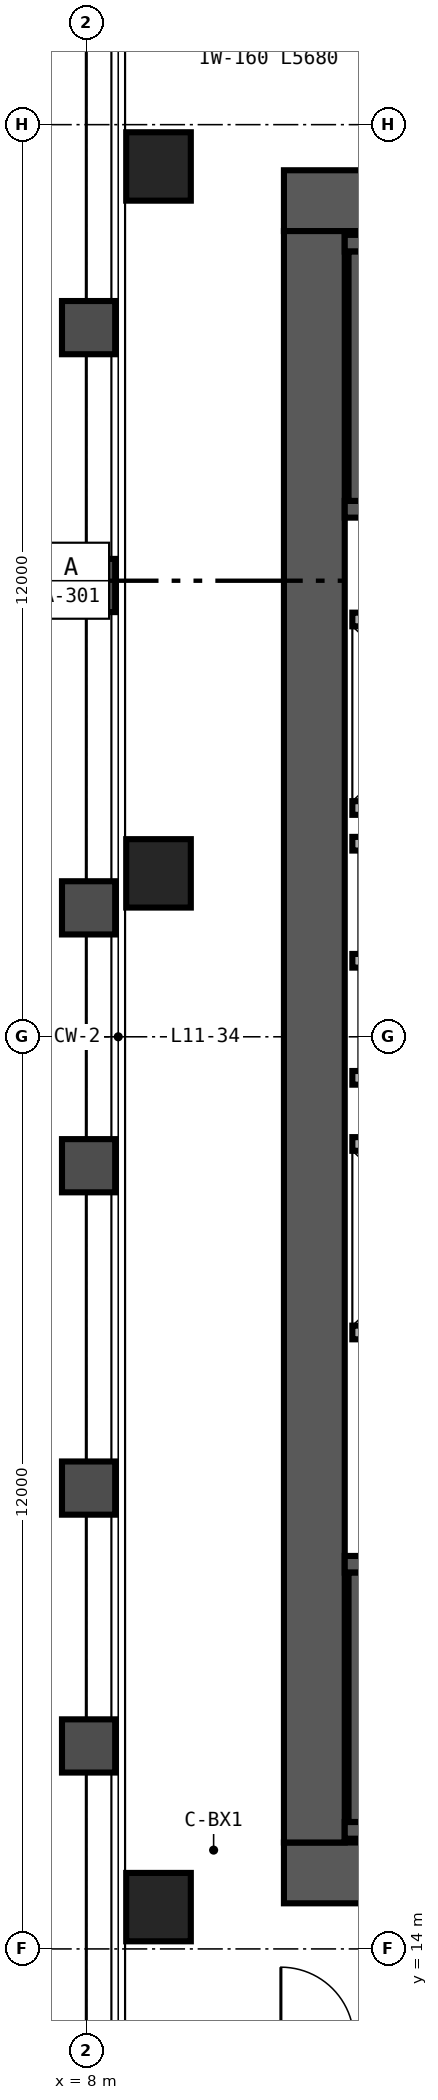
"""IFC4 building model, lengths in metres.
Left out: names, types, materials, properties, quantities, classifications, styles, units other than length and angle.
Written with IfcOpenShell. Run it as: python <this file> out.ifc"""

import sys

from ifc_helpers import new_model, si_unit, direction, frame, frame_2d, origin, origin_2d, place, context, subcontext, project, spatial, rectangle, hollow_rectangle, extrude, source, transform, mapped, element, save


model = new_model("IFC4")
c1 = context("Model", 3, precision=1e-05, world=origin(), true_north=direction((0.0, 1.0)))
c2 = subcontext(c1, "Body", "Model", "MODEL_VIEW")
j1 = project(units=[si_unit("LENGTHUNIT", "METRE"), si_unit("PLANEANGLEUNIT", "RADIAN")], contexts=[c1])
p1 = place(None, origin())
s1 = spatial("IfcSite", under=j1, at=p1, CompositionType="ELEMENT")
p2 = place(p1, origin())
s2 = spatial("IfcBuilding", under=s1, at=p2, CompositionType="ELEMENT")
p3 = place(p2, frame((0.0, 0.0, 49.2)))
s3 = spatial("IfcBuildingStorey", under=s2, at=p3, CompositionType="ELEMENT", Elevation=49.2)
p4 = place(p3, frame((10.6, 15.0, 0.0), z_axis=(0.0, 0.0, 1.0), x_axis=(1.0, 0.0, 0.0)))
e1 = element("IfcWall", 1, at=p4, inside=s3, PredefinedType="SHEAR", context=c2, shape_type="SweptSolid", body=[
    extrude(rectangle(XDim=12.8, YDim=0.8, at=frame_2d((6.4, 0.0))), origin(), (0.0, 0.0, 1.0), 3.35),
])
p5 = place(p4, frame((10.3, 0.0, 0.0)))
e2 = element("IfcOpeningElement", 2, at=p5, cuts=e1, PredefinedType="OPENING", context=c2, shape_type="SweptSolid", body=[
    extrude(rectangle(XDim=1.0, YDim=2.15, at=frame_2d((0.5, 1.075))), frame((0.0, 0.41, 0.0), z_axis=(0.0, -1.0, 0.0), x_axis=(1.0, 0.0, 0.0)), (0.0, 0.0, 1.0), 0.82),
])
p6 = place(p3, frame((10.6, 37.0, 0.0), z_axis=(0.0, 0.0, 1.0), x_axis=(1.0, 0.0, 0.0)))
e3 = element("IfcWall", 3, at=p6, inside=s3, PredefinedType="SHEAR", context=c2, shape_type="SweptSolid", body=[
    extrude(rectangle(XDim=12.8, YDim=0.8, at=frame_2d((6.4, 0.0))), origin(), (0.0, 0.0, 1.0), 3.35),
])
p7 = place(p6, frame((10.5, 0.0, 0.0)))
e4 = element("IfcOpeningElement", 4, at=p7, cuts=e3, PredefinedType="OPENING", context=c2, shape_type="SweptSolid", body=[
    extrude(rectangle(XDim=1.0, YDim=2.15, at=frame_2d((0.5, 1.075))), frame((0.0, 0.41, 0.0), z_axis=(0.0, -1.0, 0.0), x_axis=(1.0, 0.0, 0.0)), (0.0, 0.0, 1.0), 0.82),
])
p8 = place(p3, frame((11.0, 15.4, 0.0), z_axis=(0.0, 0.0, 1.0), x_axis=(0.0, 1.0, 0.0)))
e5 = element("IfcWall", 5, at=p8, inside=s3, PredefinedType="SHEAR", context=c2, shape_type="SweptSolid", body=[
    extrude(rectangle(XDim=21.2, YDim=0.8, at=frame_2d((10.6, 0.0))), origin(), (0.0, 0.0, 1.0), 3.35),
])
p9 = place(p3, frame((11.4, 15.56, 0.0), z_axis=(0.0, 0.0, 1.0), x_axis=(1.0, 0.0, 0.0)))
e6 = element("IfcWall", 6, at=p9, inside=s3, PredefinedType="SHEAR", context=c2, shape_type="SweptSolid", body=[
    extrude(rectangle(XDim=7.91, YDim=0.22, at=frame_2d((3.955, 0.0))), origin(), (0.0, 0.0, 1.0), 3.4),
])
p10 = place(p3, frame((11.4, 19.06, 0.0), z_axis=(0.0, 0.0, 1.0), x_axis=(1.0, 0.0, 0.0)))
e7 = element("IfcWall", 7, at=p10, inside=s3, PredefinedType="SHEAR", context=c2, shape_type="SweptSolid", body=[
    extrude(rectangle(XDim=7.91, YDim=0.22, at=frame_2d((3.955, 0.0))), origin(), (0.0, 0.0, 1.0), 3.4),
])
p11 = place(p10, frame((0.52, 0.0, 0.0)))
e8 = element("IfcOpeningElement", 8, at=p11, cuts=e7, PredefinedType="OPENING", context=c2, shape_type="SweptSolid", body=[
    extrude(rectangle(XDim=1.05, YDim=2.15, at=frame_2d((0.525, 1.075))), frame((0.0, 0.12, 0.0), z_axis=(0.0, -1.0, 0.0), x_axis=(1.0, 0.0, 0.0)), (0.0, 0.0, 1.0), 0.24),
])
p12 = place(p3, frame((11.56, 15.67, 0.0), z_axis=(0.0, 0.0, 1.0), x_axis=(0.0, 1.0, 0.0)))
e9 = element("IfcWall", 9, at=p12, inside=s3, PredefinedType="SHEAR", context=c2, shape_type="SweptSolid", body=[
    extrude(rectangle(XDim=3.28, YDim=0.22, at=frame_2d((1.64, 0.0))), origin(), (0.0, 0.0, 1.0), 3.4),
])
p13 = place(p3, frame((11.4, 32.94, 0.0), z_axis=(0.0, 0.0, 1.0), x_axis=(1.0, 0.0, 0.0)))
e10 = element("IfcWall", 10, at=p13, inside=s3, PredefinedType="SHEAR", context=c2, shape_type="SweptSolid", body=[
    extrude(rectangle(XDim=7.91, YDim=0.22, at=frame_2d((3.955, 0.0))), origin(), (0.0, 0.0, 1.0), 3.4),
])
p14 = place(p13, frame((0.52, 0.0, 0.0)))
e11 = element("IfcOpeningElement", 11, at=p14, cuts=e10, PredefinedType="OPENING", context=c2, shape_type="SweptSolid", body=[
    extrude(rectangle(XDim=1.05, YDim=2.15, at=frame_2d((0.525, 1.075))), frame((0.0, 0.12, 0.0), z_axis=(0.0, -1.0, 0.0), x_axis=(1.0, 0.0, 0.0)), (0.0, 0.0, 1.0), 0.24),
])
p15 = place(p3, frame((11.4, 36.44, 0.0), z_axis=(0.0, 0.0, 1.0), x_axis=(1.0, 0.0, 0.0)))
e12 = element("IfcWall", 12, at=p15, inside=s3, PredefinedType="SHEAR", context=c2, shape_type="SweptSolid", body=[
    extrude(rectangle(XDim=7.91, YDim=0.22, at=frame_2d((3.955, 0.0))), origin(), (0.0, 0.0, 1.0), 3.4),
])
p16 = place(p3, frame((11.56, 33.05, 0.0), z_axis=(0.0, 0.0, 1.0), x_axis=(0.0, 1.0, 0.0)))
e13 = element("IfcWall", 13, at=p16, inside=s3, PredefinedType="SHEAR", context=c2, shape_type="SweptSolid", body=[
    extrude(rectangle(XDim=3.28, YDim=0.22, at=frame_2d((1.64, 0.0))), origin(), (0.0, 0.0, 1.0), 3.4),
])
m1 = source(origin(), c2, "Body", "SweptSolid", [
    extrude(hollow_rectangle(XDim=0.85, YDim=0.9, WallThickness=0.04, at=origin_2d()), origin(), (0.0, 0.0, 1.0), 3.35),
])
for number, where, z_axis, x_axis in (
    (14, (8.95, 14.55, 0.0), (0.0, 0.0, 1.0), (1.0, 0.0, 0.0)),
    (15, (8.95, 28.15, 0.0), (0.0, 0.0, 1.0), (1.0, 0.0, 0.0)),
    (16, (8.95, 37.45, 0.0), (0.0, 0.0, 1.0), (1.0, 0.0, 0.0)),
):
    element("IfcColumn", number, at=place(p3, frame(where, z_axis=z_axis, x_axis=x_axis)), inside=s3, PredefinedType="COLUMN", context=c2, shape_type="MappedRepresentation", body=[
        mapped(m1, transform((0.0, 0.0, 0.0), scale=1.0)),
    ])
for number, where, z_axis, x_axis in (
    (17, (11.5, 22.11, 0.0), (0.0, 0.0, 1.0), (1.0, 0.0, 0.0)),
    (18, (11.5, 24.59, 0.0), (0.0, 0.0, 1.0), (1.0, 0.0, 0.0)),
    (19, (11.5, 29.01, 0.0), (0.0, 0.0, 1.0), (1.0, 0.0, 0.0)),
    (20, (11.5, 31.49, 0.0), (0.0, 0.0, 1.0), (1.0, 0.0, 0.0)),
):
    element("IfcWall", number, at=place(p3, frame(where, z_axis=z_axis, x_axis=x_axis)), inside=s3, PredefinedType="SOLIDWALL", context=c2, shape_type="SweptSolid", body=[
        extrude(rectangle(XDim=2.5, YDim=0.18, at=frame_2d((1.25, 0.0))), origin(), (0.0, 0.0, 1.0), 3.35),
    ])
for number, where, z_axis, x_axis in (
    (21, (11.5, 25.46, 0.0), (0.0, 0.0, 1.0), (1.0, 0.0, 0.0)),
    (22, (11.5, 27.0, 0.0), (0.0, 0.0, 1.0), (1.0, 0.0, 0.0)),
    (23, (11.5, 28.54, 0.0), (0.0, 0.0, 1.0), (1.0, 0.0, 0.0)),
):
    element("IfcWall", number, at=place(p3, frame(where, z_axis=z_axis, x_axis=x_axis)), inside=s3, PredefinedType="SOLIDWALL", context=c2, shape_type="SweptSolid", body=[
        extrude(rectangle(XDim=2.51, YDim=0.18, at=frame_2d((1.255, 0.0))), origin(), (0.0, 0.0, 1.0), 3.35),
    ])
save(model, sys.argv[1])
